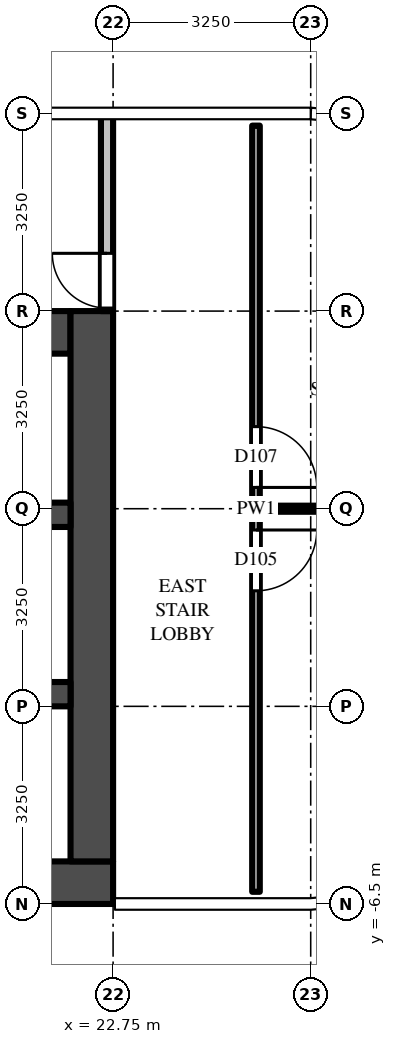
"""IFC4 building model, lengths in metres.
Left out: names, types, materials, properties, quantities, classifications, styles, units other than length and angle.
Written with IfcOpenShell. Run it as: python <this file> out.ifc"""

import sys

from ifc_helpers import new_model, si_unit, direction, frame, frame_2d, origin, place, context, subcontext, project, spatial, rectangle, extrude, source, transform, mapped, element, fill, save


model = new_model("IFC4")
c1 = context("Model", 3, precision=1e-05, world=origin(), true_north=direction((0.0, 1.0)))
c2 = subcontext(c1, "Body", "Model", "MODEL_VIEW")
j1 = project(units=[si_unit("LENGTHUNIT", "METRE"), si_unit("PLANEANGLEUNIT", "RADIAN")], contexts=[c1])
p1 = place(None, origin())
s1 = spatial("IfcSite", under=j1, at=p1, CompositionType="ELEMENT")
p2 = place(p1, origin())
s2 = spatial("IfcBuilding", under=s1, at=p2, CompositionType="ELEMENT")
p3 = place(p2, frame((0.0, 0.0, 102.0)))
s3 = spatial("IfcBuildingStorey", under=s2, at=p3, CompositionType="ELEMENT", Elevation=102.0)
m1 = source(origin(), c2, "Body", "SweptSolid", [
    extrude(rectangle(XDim=16.5, YDim=0.7, at=frame_2d((8.25, 0.0))), origin(), (0.0, 0.0, 1.0), 4.25),
])
p4 = place(p3, frame((6.25, -6.15, 0.0), z_axis=(0.0, 0.0, 1.0), x_axis=(1.0, 0.0, 0.0)))
e1 = element("IfcWall", 1, at=p4, inside=s3, PredefinedType="SHEAR", context=c2, shape_type="MappedRepresentation", body=[
    mapped(m1, transform((0.0, 0.0, 0.0))),
])
m2 = source(origin(), c2, "Body", "SweptSolid", [
    extrude(rectangle(XDim=14.85, YDim=0.7, at=frame_2d((7.425, 0.0))), origin(), (0.0, 0.0, 1.0), 4.25),
])
p5 = place(p3, frame((7.2, 2.9, 0.0), z_axis=(0.0, 0.0, 1.0), x_axis=(1.0, 0.0, 0.0)))
e2 = element("IfcWall", 2, at=p5, inside=s3, PredefinedType="SHEAR", context=c2, shape_type="MappedRepresentation", body=[
    mapped(m2, transform((0.0, 0.0, 0.0))),
])
m3 = source(origin(), c2, "Body", "SweptSolid", [
    extrude(rectangle(XDim=1.3, YDim=2.1, at=frame_2d((0.65, 1.05))), frame((0.0, 0.36, 0.0), z_axis=(0.0, -1.0, 0.0), x_axis=(1.0, 0.0, 0.0)), (0.0, 0.0, 1.0), 0.72),
])
p6 = place(p5, frame((12.2, 0.0, 0.0)))
e3 = element("IfcOpeningElement", 3, at=p6, cuts=e2, PredefinedType="OPENING", context=c2, shape_type="MappedRepresentation", body=[
    mapped(m3, transform((0.0, 0.0, 0.0))),
])
m4 = source(origin(), c2, "Body", "SweptSolid", [
    extrude(rectangle(XDim=1.2, YDim=2.1, at=frame_2d((0.6, 1.05))), frame((0.0, 0.36, 0.0), z_axis=(0.0, -1.0, 0.0), x_axis=(1.0, 0.0, 0.0)), (0.0, 0.0, 1.0), 0.72),
])
p7 = place(p5, frame((9.85, 0.0, 0.0)))
e4 = element("IfcOpeningElement", 4, at=p7, cuts=e2, PredefinedType="OPENING", context=c2, shape_type="MappedRepresentation", body=[
    mapped(m4, transform((0.0, 0.0, 0.0))),
])
m5 = source(origin(), c2, "Body", "SweptSolid", [
    extrude(rectangle(XDim=1.0, YDim=2.1, at=frame_2d((0.5, 1.05))), frame((0.0, 0.36, 0.0), z_axis=(0.0, -1.0, 0.0), x_axis=(1.0, 0.0, 0.0)), (0.0, 0.0, 1.0), 0.72),
])
p8 = place(p5, frame((7.9, 0.0, 0.0)))
e5 = element("IfcOpeningElement", 5, at=p8, cuts=e2, PredefinedType="OPENING", context=c2, shape_type="MappedRepresentation", body=[
    mapped(m5, transform((0.0, 0.0, 0.0))),
])
m6 = source(origin(), c2, "Body", "SweptSolid", [
    extrude(rectangle(XDim=0.9, YDim=2.1, at=frame_2d((0.45, 1.05))), frame((0.0, 0.36, 0.0), z_axis=(0.0, -1.0, 0.0), x_axis=(1.0, 0.0, 0.0)), (0.0, 0.0, 1.0), 0.72),
])
p9 = place(p5, frame((0.65, 0.0, 0.0)))
e6 = element("IfcOpeningElement", 6, at=p9, cuts=e2, PredefinedType="OPENING", context=c2, shape_type="MappedRepresentation", body=[
    mapped(m6, transform((0.0, 0.0, 0.0))),
])
p10 = place(p5, frame((3.25, 0.0, 0.0)))
e7 = element("IfcOpeningElement", 7, at=p10, cuts=e2, PredefinedType="OPENING", context=c2, shape_type="MappedRepresentation", body=[
    mapped(m6, transform((0.0, 0.0, 0.0))),
])
p11 = place(p5, frame((5.8, 0.0, 0.0)))
e8 = element("IfcOpeningElement", 8, at=p11, cuts=e2, PredefinedType="OPENING", context=c2, shape_type="MappedRepresentation", body=[
    mapped(m5, transform((0.0, 0.0, 0.0))),
])
m7 = source(origin(), c2, "Body", "SweptSolid", [
    extrude(rectangle(XDim=9.05, YDim=0.7, at=frame_2d((4.525, 0.0))), origin(), (0.0, 0.0, 1.0), 4.25),
])
p12 = place(p3, frame((22.4, -5.8, 0.0), z_axis=(0.0, 0.0, 1.0), x_axis=(0.0, 1.0, 0.0)))
e9 = element("IfcWall", 9, at=p12, inside=s3, PredefinedType="SHEAR", context=c2, shape_type="MappedRepresentation", body=[
    mapped(m7, transform((0.0, 0.0, 0.0))),
])
m8 = source(origin(), c2, "Body", "SweptSolid", [
    extrude(rectangle(XDim=14.85, YDim=0.4, at=frame_2d((7.425, 0.0))), origin(), (0.0, 0.0, 1.0), 4.25),
])
p13 = place(p3, frame((7.2, -0.1, 0.0), z_axis=(0.0, 0.0, 1.0), x_axis=(1.0, 0.0, 0.0)))
e10 = element("IfcWall", 10, at=p13, inside=s3, PredefinedType="SHEAR", context=c2, shape_type="MappedRepresentation", body=[
    mapped(m8, transform((0.0, 0.0, 0.0))),
])
m9 = source(origin(), c2, "Body", "SweptSolid", [
    extrude(rectangle(XDim=1.0, YDim=2.1, at=frame_2d((0.5, 1.05))), frame((0.0, 0.21, 0.0), z_axis=(0.0, -1.0, 0.0), x_axis=(1.0, 0.0, 0.0)), (0.0, 0.0, 1.0), 0.42),
])
p14 = place(p13, frame((7.9, 0.0, 0.0)))
e11 = element("IfcOpeningElement", 11, at=p14, cuts=e10, PredefinedType="OPENING", context=c2, shape_type="MappedRepresentation", body=[
    mapped(m9, transform((0.0, 0.0, 0.0))),
])
m10 = source(origin(), c2, "Body", "SweptSolid", [
    extrude(rectangle(XDim=5.7, YDim=0.4, at=frame_2d((2.85, 0.0))), origin(), (0.0, 0.0, 1.0), 4.25),
])
p15 = place(p3, frame((16.35, -3.05, 0.0), z_axis=(0.0, 0.0, 1.0), x_axis=(1.0, 0.0, 0.0)))
e12 = element("IfcWall", 12, at=p15, inside=s3, PredefinedType="SHEAR", context=c2, shape_type="MappedRepresentation", body=[
    mapped(m10, transform((0.0, 0.0, 0.0))),
])
m11 = source(origin(), c2, "Body", "SweptSolid", [
    extrude(rectangle(XDim=3.25, YDim=0.2, at=frame_2d((1.625, 0.0))), origin(), (0.0, 0.0, 1.0), 4.25),
])
p16 = place(p3, frame((22.65, 3.25, 0.0), z_axis=(0.0, 0.0, 1.0), x_axis=(0.0, 1.0, 0.0)))
e13 = element("IfcWall", 13, at=p16, inside=s3, PredefinedType="PARTITIONING", context=c2, shape_type="MappedRepresentation", body=[
    mapped(m11, transform((0.0, 0.0, 0.0))),
])
m12 = source(origin(), c2, "Body", "SweptSolid", [
    extrude(rectangle(XDim=0.9, YDim=2.1, at=frame_2d((0.45, 1.05))), frame((0.0, 0.11, 0.0), z_axis=(0.0, -1.0, 0.0), x_axis=(1.0, 0.0, 0.0)), (0.0, 0.0, 1.0), 0.22),
])
p17 = place(p16, frame((0.05, 0.0, 0.0)))
e14 = element("IfcOpeningElement", 14, at=p17, cuts=e13, PredefinedType="OPENING", context=c2, shape_type="MappedRepresentation", body=[
    mapped(m12, transform((0.0, 0.0, 0.0))),
])
m13 = source(origin(), c2, "Body", "SweptSolid", [
    extrude(rectangle(XDim=12.6, YDim=0.125, at=frame_2d((6.3, 0.0))), origin(), (0.0, 0.0, 1.0), 3.33),
])
p18 = place(p3, frame((25.1, 6.3, 0.0), z_axis=(0.0, 0.0, 1.0), x_axis=(0.0, -1.0, 0.0)))
e15 = element("IfcWall", 15, at=p18, inside=s3, PredefinedType="PARTITIONING", context=c2, shape_type="MappedRepresentation", body=[
    mapped(m13, transform((0.0, 0.0, 0.0))),
])
m14 = source(origin(), c2, "Body", "SweptSolid", [
    extrude(rectangle(XDim=1.0, YDim=2.1, at=frame_2d((0.5, 1.05))), frame((0.0, 0.073, 0.0), z_axis=(0.0, -1.0, 0.0), x_axis=(1.0, 0.0, 0.0)), (0.0, 0.0, 1.0), 0.145),
])
p19 = place(p18, frame((6.65, 0.0, 0.0)))
e16 = element("IfcOpeningElement", 16, at=p19, cuts=e15, PredefinedType="OPENING", context=c2, shape_type="MappedRepresentation", body=[
    mapped(m14, transform((0.0, 0.0, 0.0))),
])
p20 = place(p18, frame((4.95, 0.0, 0.0)))
e17 = element("IfcOpeningElement", 17, at=p20, cuts=e15, PredefinedType="OPENING", context=c2, shape_type="MappedRepresentation", body=[
    mapped(m14, transform((0.0, 0.0, 0.0))),
])
m15 = source(origin(), c2, "Body", "SweptSolid", [
    extrude(rectangle(XDim=3.887, YDim=0.1, at=frame_2d((1.944, 0.0))), origin(), (0.0, 0.0, 1.0), 3.33),
])
p21 = place(p3, frame((25.163, 0.0, 0.0), z_axis=(0.0, 0.0, 1.0), x_axis=(1.0, 0.0, 0.0)))
e18 = element("IfcWall", 18, at=p21, inside=s3, PredefinedType="PARTITIONING", context=c2, shape_type="MappedRepresentation", body=[
    mapped(m15, transform((0.0, 0.0, 0.0))),
])
m16 = source(origin(), c2, "Body", "SweptSolid", [
    extrude(rectangle(XDim=0.9, YDim=2.1, at=frame_2d((0.45, 1.05))), frame((0.0, 0.025, 0.0), z_axis=(0.0, -1.0, 0.0), x_axis=(1.0, 0.0, 0.0)), (0.0, 0.0, 1.0), 0.05),
])
p22 = place(p17, origin())
e19 = element("IfcDoor", 19, at=p22, inside=s3, OperationType="SINGLE_SWING_RIGHT", PredefinedType="DOOR", context=c2, shape_type="MappedRepresentation", body=[
    mapped(m16, transform((0.0, 0.0, 0.0))),
])
fill(e14, e19)
m17 = source(origin(), c2, "Body", "SweptSolid", [
    extrude(rectangle(XDim=1.0, YDim=2.1, at=frame_2d((0.5, 1.05))), frame((0.0, 0.025, 0.0), z_axis=(0.0, -1.0, 0.0), x_axis=(1.0, 0.0, 0.0)), (0.0, 0.0, 1.0), 0.05),
])
p23 = place(p19, origin())
e20 = element("IfcDoor", 20, at=p23, inside=s3, OperationType="SINGLE_SWING_LEFT", PredefinedType="DOOR", context=c2, shape_type="MappedRepresentation", body=[
    mapped(m17, transform((0.0, 0.0, 0.0))),
])
fill(e16, e20)
p24 = place(p20, origin())
e21 = element("IfcDoor", 21, at=p24, inside=s3, OperationType="SINGLE_SWING_RIGHT", PredefinedType="DOOR", context=c2, shape_type="MappedRepresentation", body=[
    mapped(m17, transform((0.0, 0.0, 0.0))),
])
fill(e17, e21)
save(model, sys.argv[1])
